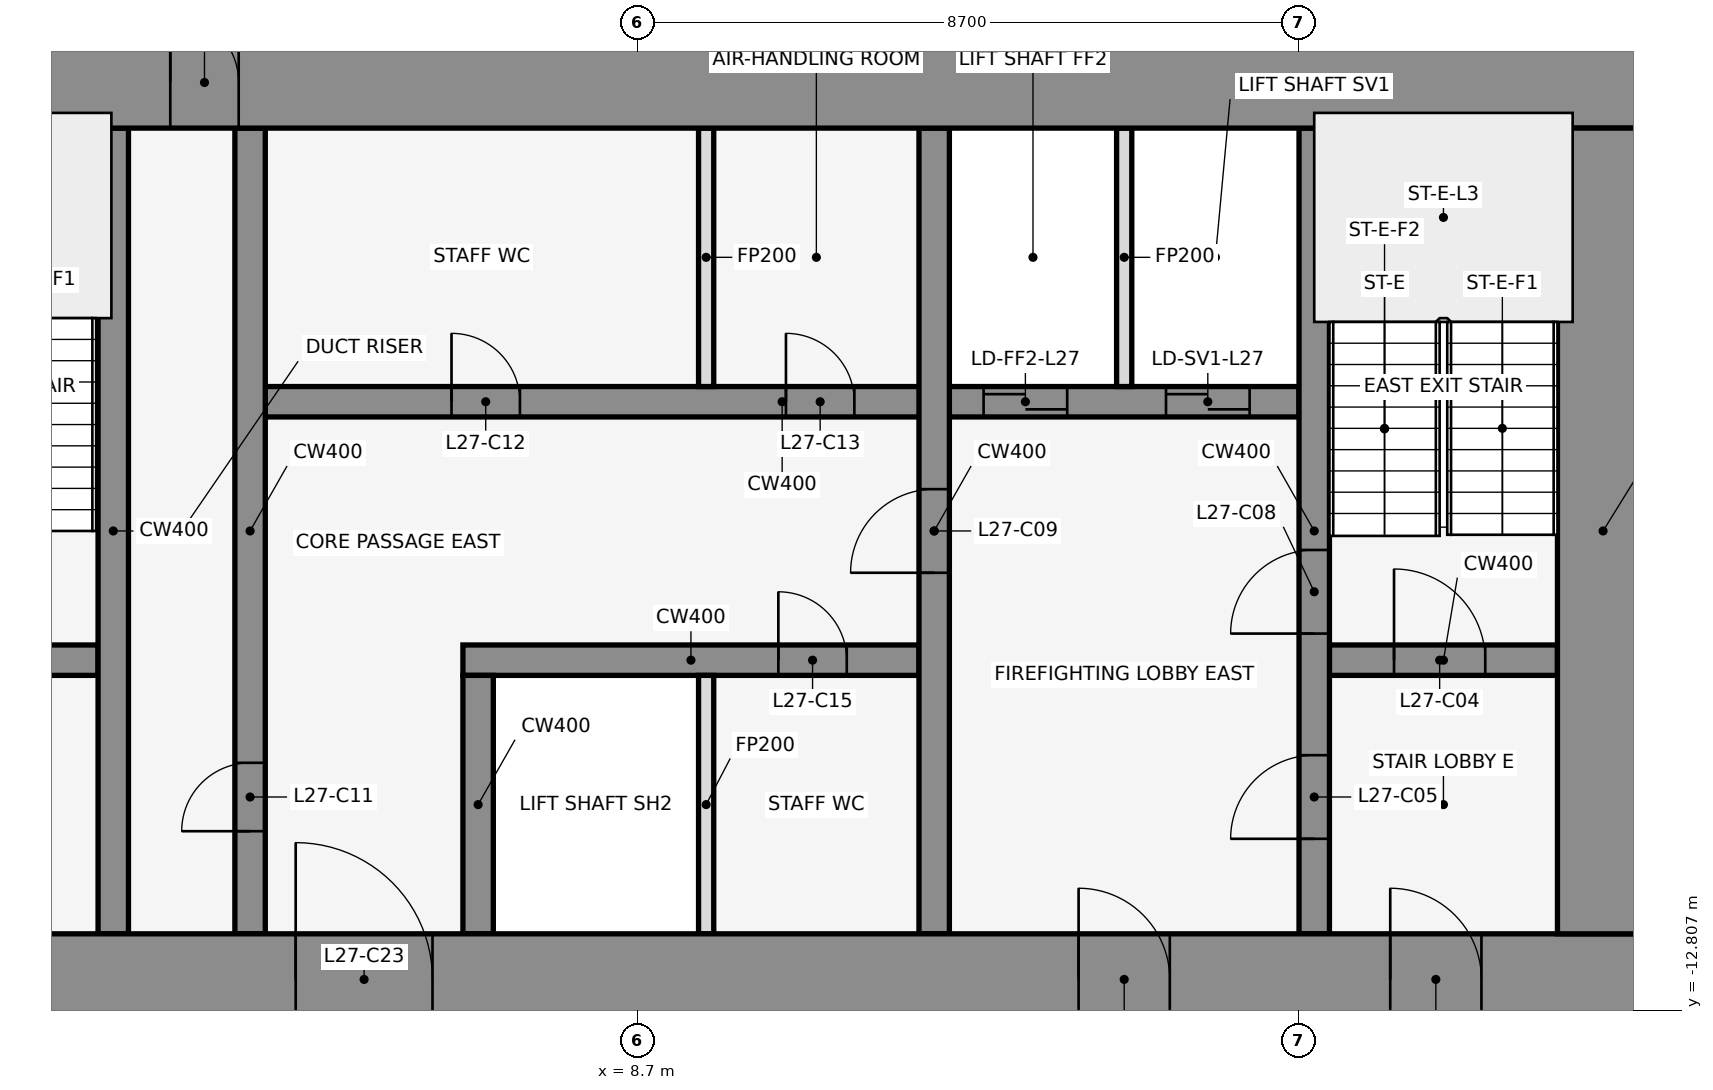
"""IFC4 building model, lengths in metres.
Left out: names, types, materials, properties, quantities, classifications, styles, units other than length and angle.
Written with IfcOpenShell. Run it as: python <this file> out.ifc"""

import sys

from ifc_helpers import new_model, si_unit, direction, frame, frame_2d, origin, place, context, subcontext, project, spatial, rectangle, extrude, element, fill, save


model = new_model("IFC4")
c1 = context("Model", 3, precision=1e-05, world=origin(), true_north=direction((0.0, 1.0)))
c2 = subcontext(c1, "Body", "Model", "MODEL_VIEW")
j1 = project(units=[si_unit("LENGTHUNIT", "METRE"), si_unit("PLANEANGLEUNIT", "RADIAN")], contexts=[c1])
p1 = place(None, origin())
s1 = spatial("IfcSite", under=j1, at=p1, CompositionType="ELEMENT")
p2 = place(p1, origin())
s2 = spatial("IfcBuilding", under=s1, at=p2, CompositionType="ELEMENT")
p3 = place(p2, frame((0.0, 0.0, 126.8)))
s3 = spatial("IfcBuildingStorey", under=s2, at=p3, CompositionType="ELEMENT", Elevation=126.8)
for number, where, z_axis, x_axis in (
    (1, (16.432, -0.105, 0.0), (0.0, 0.0, 1.0), (-0.84, 0.543, 0.0)),
    (2, (1.901, 1.08, 0.0), (0.0, 0.0, 1.0), (-0.84, -0.543, 0.0)),
):
    element("IfcWall", number, at=place(p3, frame(where, z_axis=z_axis, x_axis=x_axis)), inside=s3, PredefinedType="STANDARD", context=c2, shape_type="SweptSolid", body=[
        extrude(rectangle(XDim=2.183, YDim=0.25, at=frame_2d((1.091, 0.0))), origin(), (0.0, 0.0, 1.0), 3.95),
    ])
p4 = place(p3, frame((-1.6, -8.2, 0.0), z_axis=(0.0, 0.0, 1.0), x_axis=(1.0, 0.0, 0.0)))
e3 = element("IfcWall", 3, at=p4, inside=s3, PredefinedType="SHEAR", context=c2, shape_type="SweptSolid", body=[
    extrude(rectangle(XDim=3.2, YDim=0.4, at=frame_2d((1.6, 0.0))), origin(), (0.0, 0.0, 1.0), 4.1),
])
p5 = place(p4, frame((1.05, 0.0, 0.0)))
e4 = element("IfcOpeningElement", 4, at=p5, cuts=e3, PredefinedType="OPENING", context=c2, shape_type="SweptSolid", body=[
    extrude(rectangle(XDim=1.2, YDim=2.1, at=frame_2d((0.6, 1.05))), frame((0.0, 0.212, 0.0), z_axis=(0.0, -1.0, 0.0), x_axis=(1.0, 0.0, 0.0)), (0.0, 0.0, 1.0), 0.424),
])
p6 = place(p3, frame((6.4, -8.2, 0.0), z_axis=(0.0, 0.0, 1.0), x_axis=(1.0, 0.0, 0.0)))
e5 = element("IfcWall", 5, at=p6, inside=s3, PredefinedType="SHEAR", context=c2, shape_type="SweptSolid", body=[
    extrude(rectangle(XDim=6.0, YDim=0.4, at=frame_2d((3.0, 0.0))), origin(), (0.0, 0.0, 1.0), 4.1),
])
p7 = place(p6, frame((4.15, 0.0, 0.0)))
e6 = element("IfcOpeningElement", 6, at=p7, cuts=e5, PredefinedType="OPENING", context=c2, shape_type="SweptSolid", body=[
    extrude(rectangle(XDim=0.9, YDim=2.1, at=frame_2d((0.45, 1.05))), frame((0.0, 0.212, 0.0), z_axis=(0.0, -1.0, 0.0), x_axis=(1.0, 0.0, 0.0)), (0.0, 0.0, 1.0), 0.424),
])
p8 = place(p3, frame((17.8, -8.2, 0.0), z_axis=(0.0, 0.0, 1.0), x_axis=(1.0, 0.0, 0.0)))
e7 = element("IfcWall", 7, at=p8, inside=s3, PredefinedType="SHEAR", context=c2, shape_type="SweptSolid", body=[
    extrude(rectangle(XDim=3.0, YDim=0.4, at=frame_2d((1.5, 0.0))), origin(), (0.0, 0.0, 1.0), 4.1),
])
p9 = place(p8, frame((0.85, 0.0, 0.0)))
e8 = element("IfcOpeningElement", 8, at=p9, cuts=e7, PredefinedType="OPENING", context=c2, shape_type="SweptSolid", body=[
    extrude(rectangle(XDim=1.2, YDim=2.1, at=frame_2d((0.6, 1.05))), frame((0.0, 0.212, 0.0), z_axis=(0.0, -1.0, 0.0), x_axis=(1.0, 0.0, 0.0)), (0.0, 0.0, 1.0), 0.424),
])
p10 = place(p3, frame((3.8, -4.8, 0.0), z_axis=(0.0, 0.0, 1.0), x_axis=(1.0, 0.0, 0.0)))
e9 = element("IfcWall", 9, at=p10, inside=s3, PredefinedType="SHEAR", context=c2, shape_type="SweptSolid", body=[
    extrude(rectangle(XDim=13.6, YDim=0.4, at=frame_2d((6.8, 0.0))), origin(), (0.0, 0.0, 1.0), 4.1),
])
p11 = place(p10, frame((9.45, 0.0, 0.0)))
e10 = element("IfcOpeningElement", 10, at=p11, cuts=e9, PredefinedType="OPENING", context=c2, shape_type="SweptSolid", body=[
    extrude(rectangle(XDim=1.1, YDim=2.1, at=frame_2d((0.55, 1.05))), frame((0.0, 0.212, 0.0), z_axis=(0.0, -1.0, 0.0), x_axis=(1.0, 0.0, 0.0)), (0.0, 0.0, 1.0), 0.424),
])
p12 = place(p10, frame((11.85, 0.0, 0.0)))
e11 = element("IfcOpeningElement", 11, at=p12, cuts=e9, PredefinedType="OPENING", context=c2, shape_type="SweptSolid", body=[
    extrude(rectangle(XDim=1.1, YDim=2.1, at=frame_2d((0.55, 1.05))), frame((0.0, 0.212, 0.0), z_axis=(0.0, -1.0, 0.0), x_axis=(1.0, 0.0, 0.0)), (0.0, 0.0, 1.0), 0.424),
])
p13 = place(p10, frame((2.45, 0.0, 0.0)))
e12 = element("IfcOpeningElement", 12, at=p13, cuts=e9, PredefinedType="OPENING", context=c2, shape_type="SweptSolid", body=[
    extrude(rectangle(XDim=0.9, YDim=2.1, at=frame_2d((0.45, 1.05))), frame((0.0, 0.212, 0.0), z_axis=(0.0, -1.0, 0.0), x_axis=(1.0, 0.0, 0.0)), (0.0, 0.0, 1.0), 0.424),
])
p14 = place(p10, frame((6.85, 0.0, 0.0)))
e13 = element("IfcOpeningElement", 13, at=p14, cuts=e9, PredefinedType="OPENING", context=c2, shape_type="SweptSolid", body=[
    extrude(rectangle(XDim=0.9, YDim=2.1, at=frame_2d((0.45, 1.05))), frame((0.0, 0.212, 0.0), z_axis=(0.0, -1.0, 0.0), x_axis=(1.0, 0.0, 0.0)), (0.0, 0.0, 1.0), 0.424),
])
p15 = place(p3, frame((1.8, -11.8, 0.0), z_axis=(0.0, 0.0, 1.0), x_axis=(0.0, 1.0, 0.0)))
e14 = element("IfcWall", 14, at=p15, inside=s3, PredefinedType="SHEAR", context=c2, shape_type="SweptSolid", body=[
    extrude(rectangle(XDim=10.6, YDim=0.4, at=frame_2d((5.3, 0.0))), origin(), (0.0, 0.0, 1.0), 4.1),
])
p16 = place(p3, frame((3.6, -11.8, 0.0), z_axis=(0.0, 0.0, 1.0), x_axis=(0.0, 1.0, 0.0)))
e15 = element("IfcWall", 15, at=p16, inside=s3, PredefinedType="SHEAR", context=c2, shape_type="SweptSolid", body=[
    extrude(rectangle(XDim=10.6, YDim=0.4, at=frame_2d((5.3, 0.0))), origin(), (0.0, 0.0, 1.0), 4.1),
])
p17 = place(p16, frame((1.35, 0.0, 0.0)))
e16 = element("IfcOpeningElement", 16, at=p17, cuts=e15, PredefinedType="OPENING", context=c2, shape_type="SweptSolid", body=[
    extrude(rectangle(XDim=0.9, YDim=2.1, at=frame_2d((0.45, 1.05))), frame((0.0, 0.212, 0.0), z_axis=(0.0, -1.0, 0.0), x_axis=(1.0, 0.0, 0.0)), (0.0, 0.0, 1.0), 0.424),
])
p18 = place(p3, frame((6.6, -11.8, 0.0), z_axis=(0.0, 0.0, 1.0), x_axis=(0.0, 1.0, 0.0)))
e17 = element("IfcWall", 17, at=p18, inside=s3, PredefinedType="SHEAR", context=c2, shape_type="SweptSolid", body=[
    extrude(rectangle(XDim=3.4, YDim=0.4, at=frame_2d((1.7, 0.0))), origin(), (0.0, 0.0, 1.0), 4.1),
])
for number, where, z_axis, x_axis in (
    (18, (9.6, -11.8, 0.0), (0.0, 0.0, 1.0), (0.0, 1.0, 0.0)),
    (19, (9.6, -4.6, 0.0), (0.0, 0.0, 1.0), (0.0, 1.0, 0.0)),
):
    element("IfcWall", number, at=place(p3, frame(where, z_axis=z_axis, x_axis=x_axis)), inside=s3, PredefinedType="PARTITIONING", context=c2, shape_type="SweptSolid", body=[
        extrude(rectangle(XDim=3.4, YDim=0.2, at=frame_2d((1.7, 0.0))), origin(), (0.0, 0.0, 1.0), 2.939),
    ])
p19 = place(p3, frame((12.6, -11.8, 0.0), z_axis=(0.0, 0.0, 1.0), x_axis=(0.0, 1.0, 0.0)))
e20 = element("IfcWall", 20, at=p19, inside=s3, PredefinedType="SHEAR", context=c2, shape_type="SweptSolid", body=[
    extrude(rectangle(XDim=10.6, YDim=0.4, at=frame_2d((5.3, 0.0))), origin(), (0.0, 0.0, 1.0), 4.1),
])
p20 = place(p19, frame((4.75, 0.0, 0.0)))
e21 = element("IfcOpeningElement", 21, at=p20, cuts=e20, PredefinedType="OPENING", context=c2, shape_type="SweptSolid", body=[
    extrude(rectangle(XDim=1.1, YDim=2.1, at=frame_2d((0.55, 1.05))), frame((0.0, 0.212, 0.0), z_axis=(0.0, -1.0, 0.0), x_axis=(1.0, 0.0, 0.0)), (0.0, 0.0, 1.0), 0.424),
])
p21 = place(p3, frame((15.1, -4.6, 0.0), z_axis=(0.0, 0.0, 1.0), x_axis=(0.0, 1.0, 0.0)))
e22 = element("IfcWall", 22, at=p21, inside=s3, PredefinedType="PARTITIONING", context=c2, shape_type="SweptSolid", body=[
    extrude(rectangle(XDim=3.4, YDim=0.2, at=frame_2d((1.7, 0.0))), origin(), (0.0, 0.0, 1.0), 2.939),
])
p22 = place(p3, frame((17.6, -11.8, 0.0), z_axis=(0.0, 0.0, 1.0), x_axis=(0.0, 1.0, 0.0)))
e23 = element("IfcWall", 23, at=p22, inside=s3, PredefinedType="SHEAR", context=c2, shape_type="SweptSolid", body=[
    extrude(rectangle(XDim=10.6, YDim=0.4, at=frame_2d((5.3, 0.0))), origin(), (0.0, 0.0, 1.0), 4.1),
])
p23 = place(p22, frame((1.25, 0.0, 0.0)))
e24 = element("IfcOpeningElement", 24, at=p23, cuts=e23, PredefinedType="OPENING", context=c2, shape_type="SweptSolid", body=[
    extrude(rectangle(XDim=1.1, YDim=2.1, at=frame_2d((0.55, 1.05))), frame((0.0, 0.212, 0.0), z_axis=(0.0, -1.0, 0.0), x_axis=(1.0, 0.0, 0.0)), (0.0, 0.0, 1.0), 0.424),
])
p24 = place(p22, frame((3.95, 0.0, 0.0)))
e25 = element("IfcOpeningElement", 25, at=p24, cuts=e23, PredefinedType="OPENING", context=c2, shape_type="SweptSolid", body=[
    extrude(rectangle(XDim=1.1, YDim=2.1, at=frame_2d((0.55, 1.05))), frame((0.0, 0.212, 0.0), z_axis=(0.0, -1.0, 0.0), x_axis=(1.0, 0.0, 0.0)), (0.0, 0.0, 1.0), 0.424),
])
p25 = place(p3, frame((-22.0, -0.6, 0.0), z_axis=(0.0, 0.0, 1.0), x_axis=(1.0, 0.0, 0.0)))
e26 = element("IfcWall", 26, at=p25, inside=s3, PredefinedType="SHEAR", context=c2, shape_type="SweptSolid", body=[
    extrude(rectangle(XDim=44.0, YDim=1.2, at=frame_2d((22.0, 0.0))), origin(), (0.0, 0.0, 1.0), 4.1),
])
p26 = place(p25, frame((18.55, 0.0, 0.0)))
e27 = element("IfcOpeningElement", 27, at=p26, cuts=e26, PredefinedType="OPENING", context=c2, shape_type="SweptSolid", body=[
    extrude(rectangle(XDim=0.9, YDim=2.1, at=frame_2d((0.45, 1.05))), frame((0.0, 0.612, 0.0), z_axis=(0.0, -1.0, 0.0), x_axis=(1.0, 0.0, 0.0)), (0.0, 0.0, 1.0), 1.224),
])
p27 = place(p25, frame((24.55, 0.0, 0.0)))
e28 = element("IfcOpeningElement", 28, at=p27, cuts=e26, PredefinedType="OPENING", context=c2, shape_type="SweptSolid", body=[
    extrude(rectangle(XDim=0.9, YDim=2.1, at=frame_2d((0.45, 1.05))), frame((0.0, 0.612, 0.0), z_axis=(0.0, -1.0, 0.0), x_axis=(1.0, 0.0, 0.0)), (0.0, 0.0, 1.0), 1.224),
])
p28 = place(p3, frame((-22.0, -12.4, 0.0), z_axis=(0.0, 0.0, 1.0), x_axis=(1.0, 0.0, 0.0)))
e29 = element("IfcWall", 29, at=p28, inside=s3, PredefinedType="SHEAR", context=c2, shape_type="SweptSolid", body=[
    extrude(rectangle(XDim=44.0, YDim=1.2, at=frame_2d((22.0, 0.0))), origin(), (0.0, 0.0, 1.0), 4.1),
])
p29 = place(p28, frame((2.2, 0.0, 0.0)))
e30 = element("IfcOpeningElement", 30, at=p29, cuts=e29, PredefinedType="OPENING", context=c2, shape_type="SweptSolid", body=[
    extrude(rectangle(XDim=1.2, YDim=2.1, at=frame_2d((0.6, 1.05))), frame((0.0, 0.612, 0.0), z_axis=(0.0, -1.0, 0.0), x_axis=(1.0, 0.0, 0.0)), (0.0, 0.0, 1.0), 1.224),
])
p30 = place(p28, frame((21.4, 0.0, 0.0)))
e31 = element("IfcOpeningElement", 31, at=p30, cuts=e29, PredefinedType="OPENING", context=c2, shape_type="SweptSolid", body=[
    extrude(rectangle(XDim=1.2, YDim=2.1, at=frame_2d((0.6, 1.05))), frame((0.0, 0.612, 0.0), z_axis=(0.0, -1.0, 0.0), x_axis=(1.0, 0.0, 0.0)), (0.0, 0.0, 1.0), 1.224),
])
p31 = place(p28, frame((40.6, 0.0, 0.0)))
e32 = element("IfcOpeningElement", 32, at=p31, cuts=e29, PredefinedType="OPENING", context=c2, shape_type="SweptSolid", body=[
    extrude(rectangle(XDim=1.2, YDim=2.1, at=frame_2d((0.6, 1.05))), frame((0.0, 0.612, 0.0), z_axis=(0.0, -1.0, 0.0), x_axis=(1.0, 0.0, 0.0)), (0.0, 0.0, 1.0), 1.224),
])
p32 = place(p28, frame((16.0, 0.0, 0.0)))
e33 = element("IfcOpeningElement", 33, at=p32, cuts=e29, PredefinedType="OPENING", context=c2, shape_type="SweptSolid", body=[
    extrude(rectangle(XDim=1.8, YDim=2.1, at=frame_2d((0.9, 1.05))), frame((0.0, 0.612, 0.0), z_axis=(0.0, -1.0, 0.0), x_axis=(1.0, 0.0, 0.0)), (0.0, 0.0, 1.0), 1.224),
])
p33 = place(p28, frame((6.3, 0.0, 0.0)))
e34 = element("IfcOpeningElement", 34, at=p33, cuts=e29, PredefinedType="OPENING", context=c2, shape_type="SweptSolid", body=[
    extrude(rectangle(XDim=1.2, YDim=2.1, at=frame_2d((0.6, 1.05))), frame((0.0, 0.612, 0.0), z_axis=(0.0, -1.0, 0.0), x_axis=(1.0, 0.0, 0.0)), (0.0, 0.0, 1.0), 1.224),
])
p34 = place(p28, frame((26.2, 0.0, 0.0)))
e35 = element("IfcOpeningElement", 35, at=p34, cuts=e29, PredefinedType="OPENING", context=c2, shape_type="SweptSolid", body=[
    extrude(rectangle(XDim=1.8, YDim=2.1, at=frame_2d((0.9, 1.05))), frame((0.0, 0.612, 0.0), z_axis=(0.0, -1.0, 0.0), x_axis=(1.0, 0.0, 0.0)), (0.0, 0.0, 1.0), 1.224),
])
p35 = place(p28, frame((36.5, 0.0, 0.0)))
e36 = element("IfcOpeningElement", 36, at=p35, cuts=e29, PredefinedType="OPENING", context=c2, shape_type="SweptSolid", body=[
    extrude(rectangle(XDim=1.2, YDim=2.1, at=frame_2d((0.6, 1.05))), frame((0.0, 0.612, 0.0), z_axis=(0.0, -1.0, 0.0), x_axis=(1.0, 0.0, 0.0)), (0.0, 0.0, 1.0), 1.224),
])
p36 = place(p3, frame((21.4, -11.8, 0.0), z_axis=(0.0, 0.0, 1.0), x_axis=(0.0, 1.0, 0.0)))
e37 = element("IfcWall", 37, at=p36, inside=s3, PredefinedType="SHEAR", context=c2, shape_type="SweptSolid", body=[
    extrude(rectangle(XDim=10.6, YDim=1.2, at=frame_2d((5.3, 0.0))), origin(), (0.0, 0.0, 1.0), 4.1),
])
p37 = place(p9, origin())
e38 = element("IfcDoor", 38, at=p37, inside=s3, OperationType="SINGLE_SWING_RIGHT", PredefinedType="DOOR", context=c2, shape_type="SweptSolid", body=[
    extrude(rectangle(XDim=1.2, YDim=2.1, at=frame_2d((0.6, 1.05))), frame((0.0, 0.025, 0.0), z_axis=(0.0, -1.0, 0.0), x_axis=(1.0, 0.0, 0.0)), (0.0, 0.0, 1.0), 0.05),
])
fill(e8, e38)
p38 = place(p23, origin())
e39 = element("IfcDoor", 39, at=p38, inside=s3, OperationType="SINGLE_SWING_LEFT", PredefinedType="DOOR", context=c2, shape_type="SweptSolid", body=[
    extrude(rectangle(XDim=1.1, YDim=2.1, at=frame_2d((0.55, 1.05))), frame((0.0, 0.025, 0.0), z_axis=(0.0, -1.0, 0.0), x_axis=(1.0, 0.0, 0.0)), (0.0, 0.0, 1.0), 0.05),
])
fill(e24, e39)
p39 = place(p11, origin())
e40 = element("IfcDoor", 40, at=p39, inside=s3, OperationType="DOUBLE_DOOR_SLIDING", PredefinedType="DOOR", context=c2, shape_type="SweptSolid", body=[
    extrude(rectangle(XDim=1.1, YDim=2.1, at=frame_2d((0.55, 1.05))), frame((0.0, 0.025, 0.0), z_axis=(0.0, -1.0, 0.0), x_axis=(1.0, 0.0, 0.0)), (0.0, 0.0, 1.0), 0.05),
])
fill(e10, e40)
p40 = place(p12, origin())
e41 = element("IfcDoor", 41, at=p40, inside=s3, OperationType="DOUBLE_DOOR_SLIDING", PredefinedType="DOOR", context=c2, shape_type="SweptSolid", body=[
    extrude(rectangle(XDim=1.1, YDim=2.1, at=frame_2d((0.55, 1.05))), frame((0.0, 0.025, 0.0), z_axis=(0.0, -1.0, 0.0), x_axis=(1.0, 0.0, 0.0)), (0.0, 0.0, 1.0), 0.05),
])
fill(e11, e41)
p41 = place(p24, origin())
e42 = element("IfcDoor", 42, at=p41, inside=s3, OperationType="SINGLE_SWING_RIGHT", PredefinedType="DOOR", context=c2, shape_type="SweptSolid", body=[
    extrude(rectangle(XDim=1.1, YDim=2.1, at=frame_2d((0.55, 1.05))), frame((0.0, 0.025, 0.0), z_axis=(0.0, -1.0, 0.0), x_axis=(1.0, 0.0, 0.0)), (0.0, 0.0, 1.0), 0.05),
])
fill(e25, e42)
p42 = place(p20, frame((1.1, 0.0, 0.0), z_axis=(0.0, 0.0, 1.0), x_axis=(-1.0, 0.0, 0.0)))
e43 = element("IfcDoor", 43, at=p42, inside=s3, OperationType="SINGLE_SWING_RIGHT", PredefinedType="DOOR", context=c2, shape_type="SweptSolid", body=[
    extrude(rectangle(XDim=1.1, YDim=2.1, at=frame_2d((0.55, 1.05))), frame((0.0, 0.025, 0.0), z_axis=(0.0, -1.0, 0.0), x_axis=(1.0, 0.0, 0.0)), (0.0, 0.0, 1.0), 0.05),
])
fill(e21, e43)
p43 = place(p17, origin())
e44 = element("IfcDoor", 44, at=p43, inside=s3, OperationType="SINGLE_SWING_LEFT", PredefinedType="DOOR", context=c2, shape_type="SweptSolid", body=[
    extrude(rectangle(XDim=0.9, YDim=2.1, at=frame_2d((0.45, 1.05))), frame((0.0, 0.025, 0.0), z_axis=(0.0, -1.0, 0.0), x_axis=(1.0, 0.0, 0.0)), (0.0, 0.0, 1.0), 0.05),
])
fill(e16, e44)
p44 = place(p13, origin())
e45 = element("IfcDoor", 45, at=p44, inside=s3, OperationType="SINGLE_SWING_RIGHT", PredefinedType="DOOR", context=c2, shape_type="SweptSolid", body=[
    extrude(rectangle(XDim=0.9, YDim=2.1, at=frame_2d((0.45, 1.05))), frame((0.0, 0.025, 0.0), z_axis=(0.0, -1.0, 0.0), x_axis=(1.0, 0.0, 0.0)), (0.0, 0.0, 1.0), 0.05),
])
fill(e12, e45)
p45 = place(p14, origin())
e46 = element("IfcDoor", 46, at=p45, inside=s3, OperationType="SINGLE_SWING_LEFT", PredefinedType="DOOR", context=c2, shape_type="SweptSolid", body=[
    extrude(rectangle(XDim=0.9, YDim=2.1, at=frame_2d((0.45, 1.05))), frame((0.0, 0.025, 0.0), z_axis=(0.0, -1.0, 0.0), x_axis=(1.0, 0.0, 0.0)), (0.0, 0.0, 1.0), 0.05),
])
fill(e13, e46)
p46 = place(p7, frame((0.9, 0.0, 0.0), z_axis=(0.0, 0.0, 1.0), x_axis=(-1.0, 0.0, 0.0)))
e47 = element("IfcDoor", 47, at=p46, inside=s3, OperationType="SINGLE_SWING_RIGHT", PredefinedType="DOOR", context=c2, shape_type="SweptSolid", body=[
    extrude(rectangle(XDim=0.9, YDim=2.1, at=frame_2d((0.45, 1.05))), frame((0.0, 0.025, 0.0), z_axis=(0.0, -1.0, 0.0), x_axis=(1.0, 0.0, 0.0)), (0.0, 0.0, 1.0), 0.05),
])
fill(e6, e47)
p47 = place(p27, origin())
e48 = element("IfcDoor", 48, at=p47, inside=s3, OperationType="SINGLE_SWING_LEFT", PredefinedType="DOOR", context=c2, shape_type="SweptSolid", body=[
    extrude(rectangle(XDim=0.9, YDim=2.1, at=frame_2d((0.45, 1.05))), frame((0.0, 0.025, 0.0), z_axis=(0.0, -1.0, 0.0), x_axis=(1.0, 0.0, 0.0)), (0.0, 0.0, 1.0), 0.05),
])
fill(e28, e48)
p48 = place(p31, frame((1.2, 0.0, 0.0), z_axis=(0.0, 0.0, 1.0), x_axis=(-1.0, 0.0, 0.0)))
e49 = element("IfcDoor", 49, at=p48, inside=s3, OperationType="SINGLE_SWING_RIGHT", PredefinedType="DOOR", context=c2, shape_type="SweptSolid", body=[
    extrude(rectangle(XDim=1.2, YDim=2.1, at=frame_2d((0.6, 1.05))), frame((0.0, 0.025, 0.0), z_axis=(0.0, -1.0, 0.0), x_axis=(1.0, 0.0, 0.0)), (0.0, 0.0, 1.0), 0.05),
])
fill(e32, e49)
p49 = place(p34, origin())
e50 = element("IfcDoor", 50, at=p49, inside=s3, OperationType="SINGLE_SWING_LEFT", PredefinedType="DOOR", context=c2, shape_type="SweptSolid", body=[
    extrude(rectangle(XDim=1.8, YDim=2.1, at=frame_2d((0.9, 1.05))), frame((0.0, 0.025, 0.0), z_axis=(0.0, -1.0, 0.0), x_axis=(1.0, 0.0, 0.0)), (0.0, 0.0, 1.0), 0.05),
])
fill(e35, e50)
p50 = place(p35, frame((1.2, 0.0, 0.0), z_axis=(0.0, 0.0, 1.0), x_axis=(-1.0, 0.0, 0.0)))
e51 = element("IfcDoor", 51, at=p50, inside=s3, OperationType="SINGLE_SWING_RIGHT", PredefinedType="DOOR", context=c2, shape_type="SweptSolid", body=[
    extrude(rectangle(XDim=1.2, YDim=2.1, at=frame_2d((0.6, 1.05))), frame((0.0, 0.025, 0.0), z_axis=(0.0, -1.0, 0.0), x_axis=(1.0, 0.0, 0.0)), (0.0, 0.0, 1.0), 0.05),
])
fill(e36, e51)
save(model, sys.argv[1])
